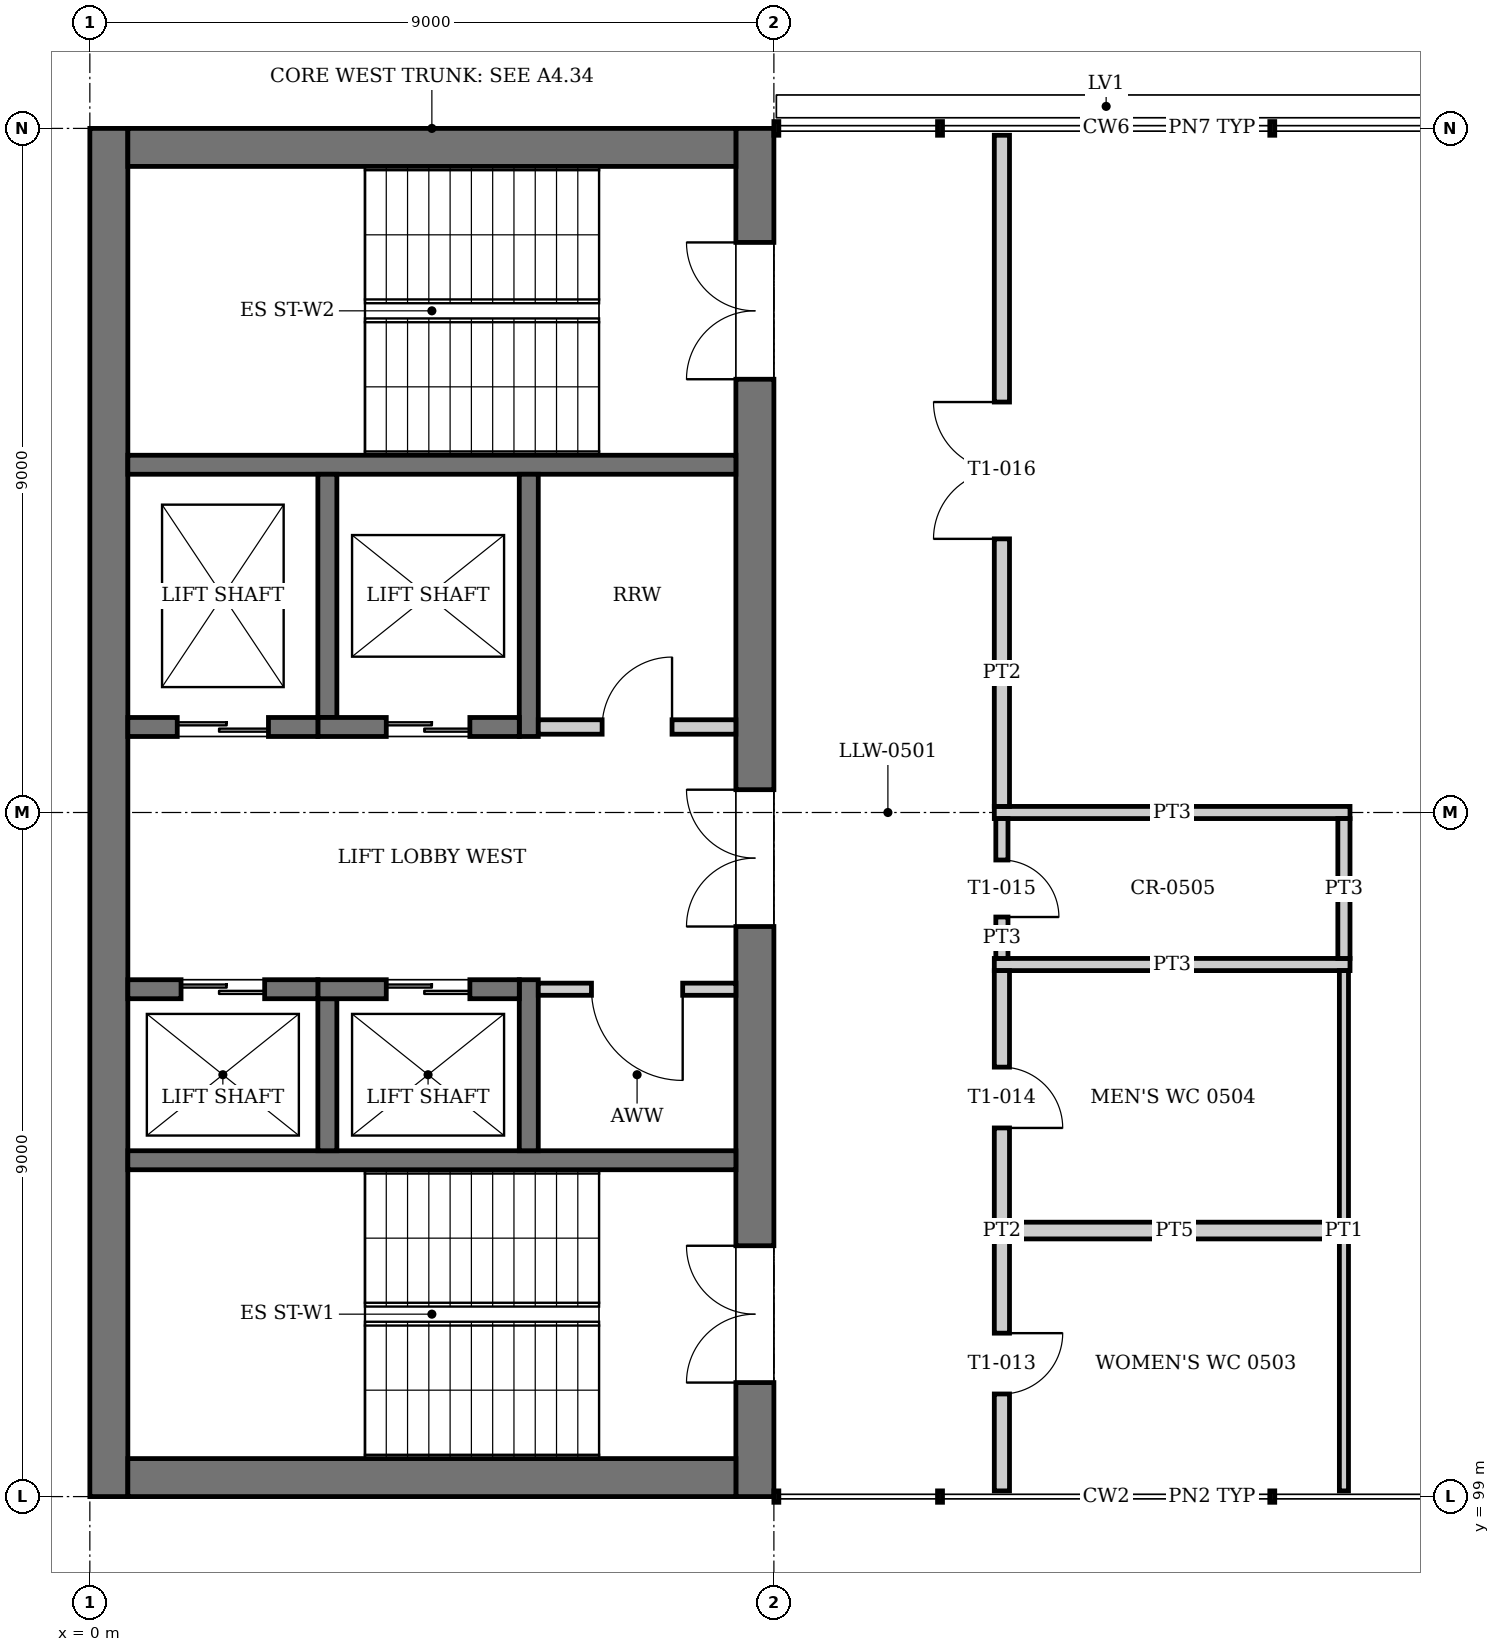
"""IFC4 building model, lengths in metres.
Left out: names, types, materials, properties, quantities, classifications, styles, units other than length and angle.
Written with IfcOpenShell. Run it as: python <this file> out.ifc"""

import sys

from ifc_helpers import new_model, si_unit, direction, frame, frame_2d, origin, place, context, subcontext, project, spatial, rectangle, extrude, element, fill, save


model = new_model("IFC4")
c1 = context("Model", 3, precision=1e-05, world=origin(), true_north=direction((0.0, 1.0)))
c2 = subcontext(c1, "Body", "Model", "MODEL_VIEW")
j1 = project(units=[si_unit("LENGTHUNIT", "METRE"), si_unit("PLANEANGLEUNIT", "RADIAN")], contexts=[c1])
p1 = place(None, origin())
s1 = spatial("IfcSite", under=j1, at=p1, CompositionType="ELEMENT")
p2 = place(p1, origin())
s2 = spatial("IfcBuilding", under=s1, at=p2, CompositionType="ELEMENT")
p3 = place(p2, frame((0.0, 0.0, 23.2)))
s3 = spatial("IfcBuildingStorey", under=s2, at=p3, CompositionType="ELEMENT", Elevation=23.2)
p4 = place(p3, frame((0.25, 99.0, 0.0), z_axis=(0.0, 0.0, 1.0), x_axis=(0.0, 1.0, 0.0)))
e1 = element("IfcWall", 1, at=p4, inside=s3, PredefinedType="SHEAR", context=c2, shape_type="SweptSolid", body=[
    extrude(rectangle(XDim=18.0, YDim=0.5, at=frame_2d((9.0, 0.0))), origin(), (0.0, 0.0, 1.0), 4.0),
])
p5 = place(p3, frame((8.75, 99.0, 0.0), z_axis=(0.0, 0.0, 1.0), x_axis=(0.0, 1.0, 0.0)))
e2 = element("IfcWall", 2, at=p5, inside=s3, PredefinedType="SHEAR", context=c2, shape_type="SweptSolid", body=[
    extrude(rectangle(XDim=18.0, YDim=0.5, at=frame_2d((9.0, 0.0))), origin(), (0.0, 0.0, 1.0), 4.0),
])
p6 = place(p5, frame((1.5, 0.0, 0.0)))
e3 = element("IfcOpeningElement", 3, at=p6, cuts=e2, PredefinedType="OPENING", context=c2, shape_type="SweptSolid", body=[
    extrude(rectangle(XDim=1.8, YDim=2.1, at=frame_2d((0.9, 1.05))), frame((0.0, 0.26, 0.0), z_axis=(0.0, -1.0, 0.0), x_axis=(1.0, 0.0, 0.0)), (0.0, 0.0, 1.0), 0.52),
])
p7 = place(p5, frame((14.7, 0.0, 0.0)))
e4 = element("IfcOpeningElement", 4, at=p7, cuts=e2, PredefinedType="OPENING", context=c2, shape_type="SweptSolid", body=[
    extrude(rectangle(XDim=1.8, YDim=2.1, at=frame_2d((0.9, 1.05))), frame((0.0, 0.26, 0.0), z_axis=(0.0, -1.0, 0.0), x_axis=(1.0, 0.0, 0.0)), (0.0, 0.0, 1.0), 0.52),
])
p8 = place(p5, frame((7.5, 0.0, 0.0)))
e5 = element("IfcOpeningElement", 5, at=p8, cuts=e2, PredefinedType="OPENING", context=c2, shape_type="SweptSolid", body=[
    extrude(rectangle(XDim=1.8, YDim=2.1, at=frame_2d((0.9, 1.05))), frame((0.0, 0.26, 0.0), z_axis=(0.0, -1.0, 0.0), x_axis=(1.0, 0.0, 0.0)), (0.0, 0.0, 1.0), 0.52),
])
for number, where, z_axis, x_axis in (
    (6, (0.5, 99.25, 0.0), (0.0, 0.0, 1.0), (1.0, 0.0, 0.0)),
    (7, (0.5, 116.75, 0.0), (0.0, 0.0, 1.0), (1.0, 0.0, 0.0)),
):
    element("IfcWall", number, at=place(p3, frame(where, z_axis=z_axis, x_axis=x_axis)), inside=s3, PredefinedType="SHEAR", context=c2, shape_type="SweptSolid", body=[
        extrude(rectangle(XDim=8.0, YDim=0.5, at=frame_2d((4.0, 0.0))), origin(), (0.0, 0.0, 1.0), 4.0),
    ])
for number, where, z_axis, x_axis in (
    (8, (8.5, 103.425, 0.0), (0.0, 0.0, 1.0), (-1.0, 0.0, 0.0)),
    (9, (8.5, 112.575, 0.0), (0.0, 0.0, 1.0), (-1.0, 0.0, 0.0)),
):
    element("IfcWall", number, at=place(p3, frame(where, z_axis=z_axis, x_axis=x_axis)), inside=s3, PredefinedType="SOLIDWALL", context=c2, shape_type="SweptSolid", body=[
        extrude(rectangle(XDim=8.0, YDim=0.25, at=frame_2d((4.0, 0.0))), origin(), (0.0, 0.0, 1.0), 3.75),
    ])
p9 = place(p3, frame((5.775, 103.55, 0.0), z_axis=(0.0, 0.0, 1.0), x_axis=(0.0, 1.0, 0.0)))
e10 = element("IfcWall", 10, at=p9, inside=s3, PredefinedType="SOLIDWALL", context=c2, shape_type="SweptSolid", body=[
    extrude(rectangle(XDim=2.25, YDim=0.25, at=frame_2d((1.125, 0.0))), origin(), (0.0, 0.0, 1.0), 4.0),
])
p10 = place(p3, frame((3.125, 103.55, 0.0), z_axis=(0.0, 0.0, 1.0), x_axis=(0.0, 1.0, 0.0)))
e11 = element("IfcWall", 11, at=p10, inside=s3, PredefinedType="SOLIDWALL", context=c2, shape_type="SweptSolid", body=[
    extrude(rectangle(XDim=2.0, YDim=0.25, at=frame_2d((1.0, 0.0))), origin(), (0.0, 0.0, 1.0), 4.0),
])
p11 = place(p3, frame((5.65, 105.675, 0.0), z_axis=(0.0, 0.0, 1.0), x_axis=(-1.0, 0.0, 0.0)))
e12 = element("IfcWall", 12, at=p11, inside=s3, PredefinedType="SOLIDWALL", context=c2, shape_type="SweptSolid", body=[
    extrude(rectangle(XDim=2.65, YDim=0.25, at=frame_2d((1.325, 0.0))), origin(), (0.0, 0.0, 1.0), 4.0),
])
p12 = place(p11, frame((0.65, 0.0, 0.0)))
e13 = element("IfcOpeningElement", 13, at=p12, cuts=e12, PredefinedType="OPENING", context=c2, shape_type="SweptSolid", body=[
    extrude(rectangle(XDim=1.1, YDim=2.1, at=frame_2d((0.55, 1.05))), frame((0.0, 0.135, 0.0), z_axis=(0.0, -1.0, 0.0), x_axis=(1.0, 0.0, 0.0)), (0.0, 0.0, 1.0), 0.27),
])
p13 = place(p3, frame((3.0, 105.675, 0.0), z_axis=(0.0, 0.0, 1.0), x_axis=(-1.0, 0.0, 0.0)))
e14 = element("IfcWall", 14, at=p13, inside=s3, PredefinedType="SOLIDWALL", context=c2, shape_type="SweptSolid", body=[
    extrude(rectangle(XDim=2.5, YDim=0.25, at=frame_2d((1.25, 0.0))), origin(), (0.0, 0.0, 1.0), 4.0),
])
p14 = place(p13, frame((0.7, 0.0, 0.0)))
e15 = element("IfcOpeningElement", 15, at=p14, cuts=e14, PredefinedType="OPENING", context=c2, shape_type="SweptSolid", body=[
    extrude(rectangle(XDim=1.1, YDim=2.1, at=frame_2d((0.55, 1.05))), frame((0.0, 0.135, 0.0), z_axis=(0.0, -1.0, 0.0), x_axis=(1.0, 0.0, 0.0)), (0.0, 0.0, 1.0), 0.27),
])
p15 = place(p3, frame((5.775, 109.0, 0.0), z_axis=(0.0, 0.0, 1.0), x_axis=(0.0, 1.0, 0.0)))
e16 = element("IfcWall", 16, at=p15, inside=s3, PredefinedType="SOLIDWALL", context=c2, shape_type="SweptSolid", body=[
    extrude(rectangle(XDim=3.45, YDim=0.25, at=frame_2d((1.725, 0.0))), origin(), (0.0, 0.0, 1.0), 4.0),
])
p16 = place(p3, frame((3.125, 109.25, 0.0), z_axis=(0.0, 0.0, 1.0), x_axis=(0.0, 1.0, 0.0)))
e17 = element("IfcWall", 17, at=p16, inside=s3, PredefinedType="SOLIDWALL", context=c2, shape_type="SweptSolid", body=[
    extrude(rectangle(XDim=3.2, YDim=0.25, at=frame_2d((1.6, 0.0))), origin(), (0.0, 0.0, 1.0), 4.0),
])
p17 = place(p3, frame((5.65, 109.125, 0.0), z_axis=(0.0, 0.0, 1.0), x_axis=(-1.0, 0.0, 0.0)))
e18 = element("IfcWall", 18, at=p17, inside=s3, PredefinedType="SOLIDWALL", context=c2, shape_type="SweptSolid", body=[
    extrude(rectangle(XDim=2.65, YDim=0.25, at=frame_2d((1.325, 0.0))), origin(), (0.0, 0.0, 1.0), 4.0),
])
p18 = place(p17, frame((0.65, 0.0, 0.0)))
e19 = element("IfcOpeningElement", 19, at=p18, cuts=e18, PredefinedType="OPENING", context=c2, shape_type="SweptSolid", body=[
    extrude(rectangle(XDim=1.1, YDim=2.1, at=frame_2d((0.55, 1.05))), frame((0.0, 0.135, 0.0), z_axis=(0.0, -1.0, 0.0), x_axis=(1.0, 0.0, 0.0)), (0.0, 0.0, 1.0), 0.27),
])
p19 = place(p3, frame((3.0, 109.125, 0.0), z_axis=(0.0, 0.0, 1.0), x_axis=(-1.0, 0.0, 0.0)))
e20 = element("IfcWall", 20, at=p19, inside=s3, PredefinedType="SOLIDWALL", context=c2, shape_type="SweptSolid", body=[
    extrude(rectangle(XDim=2.5, YDim=0.25, at=frame_2d((1.25, 0.0))), origin(), (0.0, 0.0, 1.0), 4.0),
])
p20 = place(p19, frame((0.65, 0.0, 0.0)))
e21 = element("IfcOpeningElement", 21, at=p20, cuts=e20, PredefinedType="OPENING", context=c2, shape_type="SweptSolid", body=[
    extrude(rectangle(XDim=1.2, YDim=2.1, at=frame_2d((0.6, 1.05))), frame((0.0, 0.135, 0.0), z_axis=(0.0, -1.0, 0.0), x_axis=(1.0, 0.0, 0.0)), (0.0, 0.0, 1.0), 0.27),
])
p21 = place(p3, frame((8.5, 105.675, 0.0), z_axis=(0.0, 0.0, 1.0), x_axis=(-1.0, 0.0, 0.0)))
e22 = element("IfcWall", 22, at=p21, inside=s3, PredefinedType="PARTITIONING", context=c2, shape_type="SweptSolid", body=[
    extrude(rectangle(XDim=2.6, YDim=0.16, at=frame_2d((1.3, 0.0))), origin(), (0.0, 0.0, 1.0), 3.75),
])
p22 = place(p21, frame((0.7, 0.0, 0.0)))
e23 = element("IfcOpeningElement", 23, at=p22, cuts=e22, PredefinedType="OPENING", context=c2, shape_type="SweptSolid", body=[
    extrude(rectangle(XDim=1.2, YDim=2.1, at=frame_2d((0.6, 1.05))), frame((0.0, 0.09, 0.0), z_axis=(0.0, -1.0, 0.0), x_axis=(1.0, 0.0, 0.0)), (0.0, 0.0, 1.0), 0.18),
])
p23 = place(p3, frame((8.5, 109.125, 0.0), z_axis=(0.0, 0.0, 1.0), x_axis=(-1.0, 0.0, 0.0)))
e24 = element("IfcWall", 24, at=p23, inside=s3, PredefinedType="PARTITIONING", context=c2, shape_type="SweptSolid", body=[
    extrude(rectangle(XDim=2.6, YDim=0.19, at=frame_2d((1.3, 0.0))), origin(), (0.0, 0.0, 1.0), 3.75),
])
p24 = place(p23, frame((0.84, 0.0, 0.0)))
e25 = element("IfcOpeningElement", 25, at=p24, cuts=e24, PredefinedType="OPENING", context=c2, shape_type="SweptSolid", body=[
    extrude(rectangle(XDim=0.92, YDim=2.1, at=frame_2d((0.46, 1.05))), frame((0.0, 0.105, 0.0), z_axis=(0.0, -1.0, 0.0), x_axis=(1.0, 0.0, 0.0)), (0.0, 0.0, 1.0), 0.21),
])
p25 = place(p3, frame((12.1, 102.5, 0.0), z_axis=(0.0, 0.0, 1.0), x_axis=(1.0, 0.0, 0.0)))
e26 = element("IfcWall", 26, at=p25, inside=s3, PredefinedType="PLUMBINGWALL", context=c2, shape_type="SweptSolid", body=[
    extrude(rectangle(XDim=4.34, YDim=0.22, at=frame_2d((2.17, 0.0))), origin(), (0.0, 0.0, 1.0), 3.05),
])
for number, where, z_axis, x_axis in (
    (27, (11.9, 106.0, 0.0), (0.0, 0.0, 1.0), (1.0, 0.0, 0.0)),
    (28, (11.9, 108.0, 0.0), (0.0, 0.0, 1.0), (1.0, 0.0, 0.0)),
):
    element("IfcWall", number, at=place(p3, frame(where, z_axis=z_axis, x_axis=x_axis)), inside=s3, PredefinedType="PARTITIONING", context=c2, shape_type="SweptSolid", body=[
        extrude(rectangle(XDim=4.68, YDim=0.16, at=frame_2d((2.34, 0.0))), origin(), (0.0, 0.0, 1.0), 3.05),
    ])
p26 = place(p3, frame((12.0, 99.075, 0.0), z_axis=(0.0, 0.0, 1.0), x_axis=(0.0, 1.0, 0.0)))
e29 = element("IfcWall", 29, at=p26, inside=s3, PredefinedType="PARTITIONING", context=c2, shape_type="SweptSolid", body=[
    extrude(rectangle(XDim=6.845, YDim=0.2, at=frame_2d((3.422, 0.0))), origin(), (0.0, 0.0, 1.0), 3.85),
])
p27 = place(p26, frame((1.275, 0.0, 0.0)))
e30 = element("IfcOpeningElement", 30, at=p27, cuts=e29, PredefinedType="OPENING", context=c2, shape_type="SweptSolid", body=[
    extrude(rectangle(XDim=0.8, YDim=2.1, at=frame_2d((0.4, 1.05))), frame((0.0, 0.11, 0.0), z_axis=(0.0, -1.0, 0.0), x_axis=(1.0, 0.0, 0.0)), (0.0, 0.0, 1.0), 0.22),
])
p28 = place(p26, frame((4.775, 0.0, 0.0)))
e31 = element("IfcOpeningElement", 31, at=p28, cuts=e29, PredefinedType="OPENING", context=c2, shape_type="SweptSolid", body=[
    extrude(rectangle(XDim=0.8, YDim=2.1, at=frame_2d((0.4, 1.05))), frame((0.0, 0.11, 0.0), z_axis=(0.0, -1.0, 0.0), x_axis=(1.0, 0.0, 0.0)), (0.0, 0.0, 1.0), 0.22),
])
p29 = place(p3, frame((12.0, 106.08, 0.0), z_axis=(0.0, 0.0, 1.0), x_axis=(0.0, 1.0, 0.0)))
e32 = element("IfcWall", 32, at=p29, inside=s3, PredefinedType="PARTITIONING", context=c2, shape_type="SweptSolid", body=[
    extrude(rectangle(XDim=1.84, YDim=0.16, at=frame_2d((0.92, 0.0))), origin(), (0.0, 0.0, 1.0), 3.85),
])
p30 = place(p29, frame((0.545, 0.0, 0.0)))
e33 = element("IfcOpeningElement", 33, at=p30, cuts=e32, PredefinedType="OPENING", context=c2, shape_type="SweptSolid", body=[
    extrude(rectangle(XDim=0.75, YDim=2.1, at=frame_2d((0.375, 1.05))), frame((0.0, 0.09, 0.0), z_axis=(0.0, -1.0, 0.0), x_axis=(1.0, 0.0, 0.0)), (0.0, 0.0, 1.0), 0.18),
])
p31 = place(p3, frame((12.0, 108.08, 0.0), z_axis=(0.0, 0.0, 1.0), x_axis=(0.0, 1.0, 0.0)))
e34 = element("IfcWall", 34, at=p31, inside=s3, PredefinedType="PARTITIONING", context=c2, shape_type="SweptSolid", body=[
    extrude(rectangle(XDim=8.83, YDim=0.2, at=frame_2d((4.415, 0.0))), origin(), (0.0, 0.0, 1.0), 3.85),
])
p32 = place(p31, frame((3.52, 0.0, 0.0)))
e35 = element("IfcOpeningElement", 35, at=p32, cuts=e34, PredefinedType="OPENING", context=c2, shape_type="SweptSolid", body=[
    extrude(rectangle(XDim=1.8, YDim=2.1, at=frame_2d((0.9, 1.05))), frame((0.0, 0.11, 0.0), z_axis=(0.0, -1.0, 0.0), x_axis=(1.0, 0.0, 0.0)), (0.0, 0.0, 1.0), 0.22),
])
p33 = place(p3, frame((16.5, 99.075, 0.0), z_axis=(0.0, 0.0, 1.0), x_axis=(0.0, 1.0, 0.0)))
e36 = element("IfcWall", 36, at=p33, inside=s3, PredefinedType="PARTITIONING", context=c2, shape_type="SweptSolid", body=[
    extrude(rectangle(XDim=6.845, YDim=0.12, at=frame_2d((3.422, 0.0))), origin(), (0.0, 0.0, 1.0), 3.85),
])
p34 = place(p3, frame((16.5, 106.08, 0.0), z_axis=(0.0, 0.0, 1.0), x_axis=(0.0, 1.0, 0.0)))
e37 = element("IfcWall", 37, at=p34, inside=s3, PredefinedType="PARTITIONING", context=c2, shape_type="SweptSolid", body=[
    extrude(rectangle(XDim=1.84, YDim=0.16, at=frame_2d((0.92, 0.0))), origin(), (0.0, 0.0, 1.0), 3.85),
])
p35 = place(p12, origin())
e38 = element("IfcDoor", 38, at=p35, inside=s3, OperationType="DOUBLE_DOOR_SLIDING", PredefinedType="DOOR", context=c2, shape_type="SweptSolid", body=[
    extrude(rectangle(XDim=1.1, YDim=2.1, at=frame_2d((0.55, 1.05))), frame((0.0, 0.025, 0.0), z_axis=(0.0, -1.0, 0.0), x_axis=(1.0, 0.0, 0.0)), (0.0, 0.0, 1.0), 0.05),
])
fill(e13, e38)
p36 = place(p14, origin())
e39 = element("IfcDoor", 39, at=p36, inside=s3, OperationType="DOUBLE_DOOR_SLIDING", PredefinedType="DOOR", context=c2, shape_type="SweptSolid", body=[
    extrude(rectangle(XDim=1.1, YDim=2.1, at=frame_2d((0.55, 1.05))), frame((0.0, 0.025, 0.0), z_axis=(0.0, -1.0, 0.0), x_axis=(1.0, 0.0, 0.0)), (0.0, 0.0, 1.0), 0.05),
])
fill(e15, e39)
p37 = place(p18, origin())
e40 = element("IfcDoor", 40, at=p37, inside=s3, OperationType="DOUBLE_DOOR_SLIDING", PredefinedType="DOOR", context=c2, shape_type="SweptSolid", body=[
    extrude(rectangle(XDim=1.1, YDim=2.1, at=frame_2d((0.55, 1.05))), frame((0.0, 0.025, 0.0), z_axis=(0.0, -1.0, 0.0), x_axis=(1.0, 0.0, 0.0)), (0.0, 0.0, 1.0), 0.05),
])
fill(e19, e40)
p38 = place(p20, origin())
e41 = element("IfcDoor", 41, at=p38, inside=s3, OperationType="DOUBLE_DOOR_SLIDING", PredefinedType="DOOR", context=c2, shape_type="SweptSolid", body=[
    extrude(rectangle(XDim=1.2, YDim=2.1, at=frame_2d((0.6, 1.05))), frame((0.0, 0.025, 0.0), z_axis=(0.0, -1.0, 0.0), x_axis=(1.0, 0.0, 0.0)), (0.0, 0.0, 1.0), 0.05),
])
fill(e21, e41)
p39 = place(p27, frame((0.8, 0.0, 0.0), z_axis=(0.0, 0.0, 1.0), x_axis=(-1.0, 0.0, 0.0)))
e42 = element("IfcDoor", 42, at=p39, inside=s3, OperationType="SINGLE_SWING_LEFT", PredefinedType="DOOR", context=c2, shape_type="SweptSolid", body=[
    extrude(rectangle(XDim=0.8, YDim=2.1, at=frame_2d((0.4, 1.05))), frame((0.0, 0.025, 0.0), z_axis=(0.0, -1.0, 0.0), x_axis=(1.0, 0.0, 0.0)), (0.0, 0.0, 1.0), 0.05),
])
fill(e30, e42)
p40 = place(p28, frame((0.8, 0.0, 0.0), z_axis=(0.0, 0.0, 1.0), x_axis=(-1.0, 0.0, 0.0)))
e43 = element("IfcDoor", 43, at=p40, inside=s3, OperationType="SINGLE_SWING_RIGHT", PredefinedType="DOOR", context=c2, shape_type="SweptSolid", body=[
    extrude(rectangle(XDim=0.8, YDim=2.1, at=frame_2d((0.4, 1.05))), frame((0.0, 0.025, 0.0), z_axis=(0.0, -1.0, 0.0), x_axis=(1.0, 0.0, 0.0)), (0.0, 0.0, 1.0), 0.05),
])
fill(e31, e43)
p41 = place(p30, frame((0.75, 0.0, 0.0), z_axis=(0.0, 0.0, 1.0), x_axis=(-1.0, 0.0, 0.0)))
e44 = element("IfcDoor", 44, at=p41, inside=s3, OperationType="SINGLE_SWING_RIGHT", PredefinedType="DOOR", context=c2, shape_type="SweptSolid", body=[
    extrude(rectangle(XDim=0.75, YDim=2.1, at=frame_2d((0.375, 1.05))), frame((0.0, 0.025, 0.0), z_axis=(0.0, -1.0, 0.0), x_axis=(1.0, 0.0, 0.0)), (0.0, 0.0, 1.0), 0.05),
])
fill(e33, e44)
p42 = place(p32, origin())
e45 = element("IfcDoor", 45, at=p42, inside=s3, OperationType="DOUBLE_DOOR_SINGLE_SWING", PredefinedType="DOOR", context=c2, shape_type="SweptSolid", body=[
    extrude(rectangle(XDim=1.8, YDim=2.1, at=frame_2d((0.9, 1.05))), frame((0.0, 0.025, 0.0), z_axis=(0.0, -1.0, 0.0), x_axis=(1.0, 0.0, 0.0)), (0.0, 0.0, 1.0), 0.05),
])
fill(e35, e45)
p43 = place(p6, origin())
e46 = element("IfcDoor", 46, at=p43, inside=s3, OperationType="DOUBLE_DOOR_SINGLE_SWING", PredefinedType="DOOR", context=c2, shape_type="SweptSolid", body=[
    extrude(rectangle(XDim=1.8, YDim=2.1, at=frame_2d((0.9, 1.05))), frame((0.0, 0.025, 0.0), z_axis=(0.0, -1.0, 0.0), x_axis=(1.0, 0.0, 0.0)), (0.0, 0.0, 1.0), 0.05),
])
fill(e3, e46)
p44 = place(p7, origin())
e47 = element("IfcDoor", 47, at=p44, inside=s3, OperationType="DOUBLE_DOOR_SINGLE_SWING", PredefinedType="DOOR", context=c2, shape_type="SweptSolid", body=[
    extrude(rectangle(XDim=1.8, YDim=2.1, at=frame_2d((0.9, 1.05))), frame((0.0, 0.025, 0.0), z_axis=(0.0, -1.0, 0.0), x_axis=(1.0, 0.0, 0.0)), (0.0, 0.0, 1.0), 0.05),
])
fill(e4, e47)
p45 = place(p8, origin())
e48 = element("IfcDoor", 48, at=p45, inside=s3, OperationType="DOUBLE_DOOR_SINGLE_SWING", PredefinedType="DOOR", context=c2, shape_type="SweptSolid", body=[
    extrude(rectangle(XDim=1.8, YDim=2.1, at=frame_2d((0.9, 1.05))), frame((0.0, 0.025, 0.0), z_axis=(0.0, -1.0, 0.0), x_axis=(1.0, 0.0, 0.0)), (0.0, 0.0, 1.0), 0.05),
])
fill(e5, e48)
p46 = place(p22, origin())
e49 = element("IfcDoor", 49, at=p46, inside=s3, OperationType="SINGLE_SWING_LEFT", PredefinedType="DOOR", context=c2, shape_type="SweptSolid", body=[
    extrude(rectangle(XDim=1.2, YDim=2.1, at=frame_2d((0.6, 1.05))), frame((0.0, 0.025, 0.0), z_axis=(0.0, -1.0, 0.0), x_axis=(1.0, 0.0, 0.0)), (0.0, 0.0, 1.0), 0.05),
])
fill(e23, e49)
p47 = place(p24, frame((0.92, 0.0, 0.0), z_axis=(0.0, 0.0, 1.0), x_axis=(-1.0, 0.0, 0.0)))
e50 = element("IfcDoor", 50, at=p47, inside=s3, OperationType="SINGLE_SWING_RIGHT", PredefinedType="DOOR", context=c2, shape_type="SweptSolid", body=[
    extrude(rectangle(XDim=0.92, YDim=2.1, at=frame_2d((0.46, 1.05))), frame((0.0, 0.025, 0.0), z_axis=(0.0, -1.0, 0.0), x_axis=(1.0, 0.0, 0.0)), (0.0, 0.0, 1.0), 0.05),
])
fill(e25, e50)
save(model, sys.argv[1])
